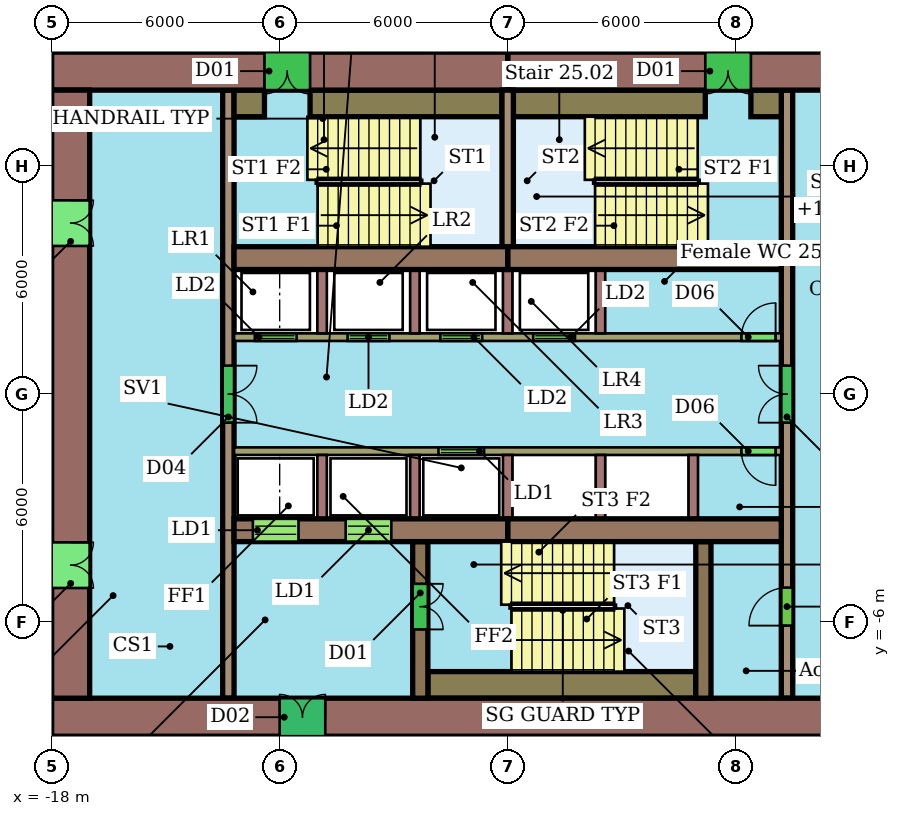
"""IFC4 building model, lengths in metres.
Left out: names, types, materials, properties, quantities, classifications, styles, units other than length and angle.
Written with IfcOpenShell. Run it as: python <this file> out.ifc"""

import sys

from ifc_helpers import new_model, si_unit, direction, frame, frame_2d, origin, place, context, subcontext, project, spatial, rectangle, extrude, element, fill, save


model = new_model("IFC4")
c1 = context("Model", 3, precision=1e-05, world=origin(), true_north=direction((0.0, 1.0)))
c2 = subcontext(c1, "Body", "Model", "MODEL_VIEW")
j1 = project(units=[si_unit("LENGTHUNIT", "METRE"), si_unit("PLANEANGLEUNIT", "RADIAN")], contexts=[c1])
p1 = place(None, origin())
s1 = spatial("IfcSite", under=j1, at=p1, CompositionType="ELEMENT")
p2 = place(p1, origin())
s2 = spatial("IfcBuilding", under=s1, at=p2, CompositionType="ELEMENT")
p3 = place(p2, frame((0.0, 0.0, 110.2)))
s3 = spatial("IfcBuildingStorey", under=s2, at=p3, CompositionType="ELEMENT", Elevation=110.2)
p4 = place(p3, frame((6.0, 8.5, 0.0), z_axis=(0.0, 0.0, 1.0), x_axis=(-1.0, 0.0, 0.0)))
e1 = element("IfcWall", 1, at=p4, inside=s3, PredefinedType="SHEAR", context=c2, shape_type="SweptSolid", body=[
    extrude(rectangle(XDim=12.0, YDim=1.0, at=frame_2d((6.0, 0.0))), origin(), (0.0, 0.0, 1.0), 3.3),
])
p5 = place(p4, frame((5.6, 0.0, 0.0)))
e2 = element("IfcOpeningElement", 2, at=p5, cuts=e1, PredefinedType="OPENING", context=c2, shape_type="SweptSolid", body=[
    extrude(rectangle(XDim=1.2, YDim=2.1, at=frame_2d((0.6, 1.05))), frame((0.0, 0.51, 0.0), z_axis=(0.0, -1.0, 0.0), x_axis=(1.0, 0.0, 0.0)), (0.0, 0.0, 1.0), 1.02),
])
p6 = place(p3, frame((-6.0, 8.5, 0.0), z_axis=(0.0, 0.0, 1.0), x_axis=(-1.0, 0.0, 0.0)))
e3 = element("IfcWall", 3, at=p6, inside=s3, PredefinedType="SHEAR", context=c2, shape_type="SweptSolid", body=[
    extrude(rectangle(XDim=12.0, YDim=1.0, at=frame_2d((6.0, 0.0))), origin(), (0.0, 0.0, 1.0), 3.3),
])
p7 = place(p6, frame((5.2, 0.0, 0.0)))
e4 = element("IfcOpeningElement", 4, at=p7, cuts=e3, PredefinedType="OPENING", context=c2, shape_type="SweptSolid", body=[
    extrude(rectangle(XDim=1.2, YDim=2.1, at=frame_2d((0.6, 1.05))), frame((0.0, 0.51, 0.0), z_axis=(0.0, -1.0, 0.0), x_axis=(1.0, 0.0, 0.0)), (0.0, 0.0, 1.0), 1.02),
])
p8 = place(p3, frame((-18.0, -8.5, 0.0), z_axis=(0.0, 0.0, 1.0), x_axis=(1.0, 0.0, 0.0)))
e5 = element("IfcWall", 5, at=p8, inside=s3, PredefinedType="SHEAR", context=c2, shape_type="SweptSolid", body=[
    extrude(rectangle(XDim=24.0, YDim=1.0, at=frame_2d((12.0, 0.0))), origin(), (0.0, 0.0, 1.0), 3.3),
])
p9 = place(p8, frame((6.0, 0.0, 0.0)))
e6 = element("IfcOpeningElement", 6, at=p9, cuts=e5, PredefinedType="OPENING", context=c2, shape_type="SweptSolid", body=[
    extrude(rectangle(XDim=1.2, YDim=2.1, at=frame_2d((0.6, 1.05))), frame((0.0, 0.51, 0.0), z_axis=(0.0, -1.0, 0.0), x_axis=(1.0, 0.0, 0.0)), (0.0, 0.0, 1.0), 1.02),
])
p10 = place(p3, frame((-17.5, 8.0, 0.0), z_axis=(0.0, 0.0, 1.0), x_axis=(0.0, -1.0, 0.0)))
e7 = element("IfcWall", 7, at=p10, inside=s3, PredefinedType="SHEAR", context=c2, shape_type="SweptSolid", body=[
    extrude(rectangle(XDim=16.0, YDim=1.0, at=frame_2d((8.0, 0.0))), origin(), (0.0, 0.0, 1.0), 3.3),
])
p11 = place(p10, frame((11.9, 0.0, 0.0)))
e8 = element("IfcOpeningElement", 8, at=p11, cuts=e7, PredefinedType="OPENING", context=c2, shape_type="SweptSolid", body=[
    extrude(rectangle(XDim=1.2, YDim=2.1, at=frame_2d((0.6, 1.05))), frame((0.0, 0.51, 0.0), z_axis=(0.0, -1.0, 0.0), x_axis=(1.0, 0.0, 0.0)), (0.0, 0.0, 1.0), 1.02),
])
p12 = place(p10, frame((2.9, 0.0, 0.0)))
e9 = element("IfcOpeningElement", 9, at=p12, cuts=e7, PredefinedType="OPENING", context=c2, shape_type="SweptSolid", body=[
    extrude(rectangle(XDim=1.2, YDim=2.1, at=frame_2d((0.6, 1.05))), frame((0.0, 0.51, 0.0), z_axis=(0.0, -1.0, 0.0), x_axis=(1.0, 0.0, 0.0)), (0.0, 0.0, 1.0), 1.02),
])
for number, where, z_axis, x_axis in (
    (10, (-13.2, 3.58, 0.0), (0.0, 0.0, 1.0), (1.0, 0.0, 0.0)),
    (11, (-6.0, 3.58, 0.0), (0.0, 0.0, 1.0), (1.0, 0.0, 0.0)),
):
    element("IfcWall", number, at=place(p3, frame(where, z_axis=z_axis, x_axis=x_axis)), inside=s3, PredefinedType="SHEAR", context=c2, shape_type="SweptSolid", body=[
        extrude(rectangle(XDim=7.2, YDim=0.6, at=frame_2d((3.6, 0.0))), origin(), (0.0, 0.0, 1.0), 3.3),
    ])
p13 = place(p3, frame((-13.2, -3.58, 0.0), z_axis=(0.0, 0.0, 1.0), x_axis=(1.0, 0.0, 0.0)))
e12 = element("IfcWall", 12, at=p13, inside=s3, PredefinedType="SHEAR", context=c2, shape_type="SweptSolid", body=[
    extrude(rectangle(XDim=7.2, YDim=0.6, at=frame_2d((3.6, 0.0))), origin(), (0.0, 0.0, 1.0), 3.3),
])
p14 = place(p13, frame((0.496, 0.0, 0.0)))
e13 = element("IfcOpeningElement", 13, at=p14, cuts=e12, PredefinedType="OPENING", context=c2, shape_type="SweptSolid", body=[
    extrude(rectangle(XDim=1.2, YDim=2.1, at=frame_2d((0.6, 1.05))), frame((0.0, 0.31, 0.0), z_axis=(0.0, -1.0, 0.0), x_axis=(1.0, 0.0, 0.0)), (0.0, 0.0, 1.0), 0.62),
])
p15 = place(p13, frame((2.938, 0.0, 0.0)))
e14 = element("IfcOpeningElement", 14, at=p15, cuts=e12, PredefinedType="OPENING", context=c2, shape_type="SweptSolid", body=[
    extrude(rectangle(XDim=1.2, YDim=2.1, at=frame_2d((0.6, 1.05))), frame((0.0, 0.31, 0.0), z_axis=(0.0, -1.0, 0.0), x_axis=(1.0, 0.0, 0.0)), (0.0, 0.0, 1.0), 0.62),
])
p16 = place(p3, frame((-6.0, -3.58, 0.0), z_axis=(0.0, 0.0, 1.0), x_axis=(1.0, 0.0, 0.0)))
e15 = element("IfcWall", 15, at=p16, inside=s3, PredefinedType="SHEAR", context=c2, shape_type="SweptSolid", body=[
    extrude(rectangle(XDim=7.2, YDim=0.6, at=frame_2d((3.6, 0.0))), origin(), (0.0, 0.0, 1.0), 3.3),
])
p17 = place(p3, frame((-13.35, 8.0, 0.0), z_axis=(0.0, 0.0, 1.0), x_axis=(0.0, -1.0, 0.0)))
e16 = element("IfcWall", 16, at=p17, inside=s3, PredefinedType="SHEAR", context=c2, shape_type="SweptSolid", body=[
    extrude(rectangle(XDim=16.0, YDim=0.3, at=frame_2d((8.0, 0.0))), origin(), (0.0, 0.0, 1.0), 3.3),
])
p18 = place(p17, frame((7.25, 0.0, 0.0)))
e17 = element("IfcOpeningElement", 17, at=p18, cuts=e16, PredefinedType="OPENING", context=c2, shape_type="SweptSolid", body=[
    extrude(rectangle(XDim=1.5, YDim=2.1, at=frame_2d((0.75, 1.05))), frame((0.0, 0.16, 0.0), z_axis=(0.0, -1.0, 0.0), x_axis=(1.0, 0.0, 0.0)), (0.0, 0.0, 1.0), 0.32),
])
p19 = place(p3, frame((1.35, -8.0, 0.0), z_axis=(0.0, 0.0, 1.0), x_axis=(0.0, 1.0, 0.0)))
e18 = element("IfcWall", 18, at=p19, inside=s3, PredefinedType="SHEAR", context=c2, shape_type="SweptSolid", body=[
    extrude(rectangle(XDim=16.0, YDim=0.3, at=frame_2d((8.0, 0.0))), origin(), (0.0, 0.0, 1.0), 3.3),
])
p20 = place(p19, frame((1.91, 0.0, 0.0)))
e19 = element("IfcOpeningElement", 19, at=p20, cuts=e18, PredefinedType="OPENING", context=c2, shape_type="SweptSolid", body=[
    extrude(rectangle(XDim=1.0, YDim=2.1, at=frame_2d((0.5, 1.05))), frame((0.0, 0.16, 0.0), z_axis=(0.0, -1.0, 0.0), x_axis=(1.0, 0.0, 0.0)), (0.0, 0.0, 1.0), 0.32),
])
p21 = place(p19, frame((7.25, 0.0, 0.0)))
e20 = element("IfcOpeningElement", 20, at=p21, cuts=e18, PredefinedType="OPENING", context=c2, shape_type="SweptSolid", body=[
    extrude(rectangle(XDim=1.5, YDim=2.1, at=frame_2d((0.75, 1.05))), frame((0.0, 0.16, 0.0), z_axis=(0.0, -1.0, 0.0), x_axis=(1.0, 0.0, 0.0)), (0.0, 0.0, 1.0), 0.32),
])
p22 = place(p3, frame((-13.2, 1.5, 0.0), z_axis=(0.0, 0.0, 1.0), x_axis=(1.0, 0.0, 0.0)))
e21 = element("IfcWall", 21, at=p22, inside=s3, PredefinedType="SHEAR", context=c2, shape_type="SweptSolid", body=[
    extrude(rectangle(XDim=14.4, YDim=0.2, at=frame_2d((7.2, 0.0))), origin(), (0.0, 0.0, 1.0), 3.3),
])
p23 = place(p22, frame((0.546, 0.0, 0.0)))
e22 = element("IfcOpeningElement", 22, at=p23, cuts=e21, PredefinedType="OPENING", context=c2, shape_type="SweptSolid", body=[
    extrude(rectangle(XDim=1.1, YDim=2.1, at=frame_2d((0.55, 1.05))), frame((0.0, 0.11, 0.0), z_axis=(0.0, -1.0, 0.0), x_axis=(1.0, 0.0, 0.0)), (0.0, 0.0, 1.0), 0.22),
])
p24 = place(p22, frame((2.988, 0.0, 0.0)))
e23 = element("IfcOpeningElement", 23, at=p24, cuts=e21, PredefinedType="OPENING", context=c2, shape_type="SweptSolid", body=[
    extrude(rectangle(XDim=1.1, YDim=2.1, at=frame_2d((0.55, 1.05))), frame((0.0, 0.11, 0.0), z_axis=(0.0, -1.0, 0.0), x_axis=(1.0, 0.0, 0.0)), (0.0, 0.0, 1.0), 0.22),
])
p25 = place(p22, frame((5.429, 0.0, 0.0)))
e24 = element("IfcOpeningElement", 24, at=p25, cuts=e21, PredefinedType="OPENING", context=c2, shape_type="SweptSolid", body=[
    extrude(rectangle(XDim=1.1, YDim=2.1, at=frame_2d((0.55, 1.05))), frame((0.0, 0.11, 0.0), z_axis=(0.0, -1.0, 0.0), x_axis=(1.0, 0.0, 0.0)), (0.0, 0.0, 1.0), 0.22),
])
p26 = place(p22, frame((7.871, 0.0, 0.0)))
e25 = element("IfcOpeningElement", 25, at=p26, cuts=e21, PredefinedType="OPENING", context=c2, shape_type="SweptSolid", body=[
    extrude(rectangle(XDim=1.1, YDim=2.1, at=frame_2d((0.55, 1.05))), frame((0.0, 0.11, 0.0), z_axis=(0.0, -1.0, 0.0), x_axis=(1.0, 0.0, 0.0)), (0.0, 0.0, 1.0), 0.22),
])
p27 = place(p22, frame((13.35, 0.0, 0.0)))
e26 = element("IfcOpeningElement", 26, at=p27, cuts=e21, PredefinedType="OPENING", context=c2, shape_type="SweptSolid", body=[
    extrude(rectangle(XDim=0.9, YDim=2.1, at=frame_2d((0.45, 1.05))), frame((0.0, 0.11, 0.0), z_axis=(0.0, -1.0, 0.0), x_axis=(1.0, 0.0, 0.0)), (0.0, 0.0, 1.0), 0.22),
])
p28 = place(p3, frame((1.2, -1.5, 0.0), z_axis=(0.0, 0.0, 1.0), x_axis=(-1.0, 0.0, 0.0)))
e27 = element("IfcWall", 27, at=p28, inside=s3, PredefinedType="SHEAR", context=c2, shape_type="SweptSolid", body=[
    extrude(rectangle(XDim=14.4, YDim=0.2, at=frame_2d((7.2, 0.0))), origin(), (0.0, 0.0, 1.0), 3.3),
])
p29 = place(p28, frame((7.821, 0.0, 0.0)))
e28 = element("IfcOpeningElement", 28, at=p29, cuts=e27, PredefinedType="OPENING", context=c2, shape_type="SweptSolid", body=[
    extrude(rectangle(XDim=1.2, YDim=2.1, at=frame_2d((0.6, 1.05))), frame((0.0, 0.11, 0.0), z_axis=(0.0, -1.0, 0.0), x_axis=(1.0, 0.0, 0.0)), (0.0, 0.0, 1.0), 0.22),
])
p30 = place(p28, frame((0.15, 0.0, 0.0)))
e29 = element("IfcOpeningElement", 29, at=p30, cuts=e27, PredefinedType="OPENING", context=c2, shape_type="SweptSolid", body=[
    extrude(rectangle(XDim=0.9, YDim=2.1, at=frame_2d((0.45, 1.05))), frame((0.0, 0.11, 0.0), z_axis=(0.0, -1.0, 0.0), x_axis=(1.0, 0.0, 0.0)), (0.0, 0.0, 1.0), 0.22),
])
p31 = place(p3, frame((-8.3, -3.88, 0.0), z_axis=(0.0, 0.0, 1.0), x_axis=(0.0, -1.0, 0.0)))
e30 = element("IfcWall", 30, at=p31, inside=s3, PredefinedType="SHEAR", context=c2, shape_type="SweptSolid", body=[
    extrude(rectangle(XDim=4.12, YDim=0.4, at=frame_2d((2.06, 0.0))), origin(), (0.0, 0.0, 1.0), 3.3),
])
p32 = place(p31, frame((1.11, 0.0, 0.0)))
e31 = element("IfcOpeningElement", 31, at=p32, cuts=e30, PredefinedType="OPENING", context=c2, shape_type="SweptSolid", body=[
    extrude(rectangle(XDim=1.2, YDim=2.1, at=frame_2d((0.6, 1.05))), frame((0.0, 0.21, 0.0), z_axis=(0.0, -1.0, 0.0), x_axis=(1.0, 0.0, 0.0)), (0.0, 0.0, 1.0), 0.42),
])
p33 = place(p3, frame((-0.85, -3.88, 0.0), z_axis=(0.0, 0.0, 1.0), x_axis=(0.0, -1.0, 0.0)))
e32 = element("IfcWall", 32, at=p33, inside=s3, PredefinedType="SHEAR", context=c2, shape_type="SweptSolid", body=[
    extrude(rectangle(XDim=4.12, YDim=0.4, at=frame_2d((2.06, 0.0))), origin(), (0.0, 0.0, 1.0), 3.3),
])
p34 = place(p3, frame((-6.0, 3.88, 0.0), z_axis=(0.0, 0.0, 1.0), x_axis=(0.0, 1.0, 0.0)))
e33 = element("IfcWall", 33, at=p34, inside=s3, PredefinedType="SHEAR", context=c2, shape_type="SweptSolid", body=[
    extrude(rectangle(XDim=4.12, YDim=0.3, at=frame_2d((2.06, 0.0))), origin(), (0.0, 0.0, 1.0), 3.3),
])
p35 = place(p3, frame((-13.2, 7.65, 0.0), z_axis=(0.0, 0.0, 1.0), x_axis=(1.0, 0.0, 0.0)))
e34 = element("IfcWall", 34, at=p35, inside=s3, PredefinedType="SHEAR", context=c2, shape_type="SweptSolid", body=[
    extrude(rectangle(XDim=0.8, YDim=0.7, at=frame_2d((0.4, 0.0))), origin(), (0.0, 0.0, 1.0), 3.3),
])
for number, where, z_axis, x_axis in (
    (35, (-11.2, 7.65, 0.0), (0.0, 0.0, 1.0), (1.0, 0.0, 0.0)),
    (36, (-5.85, 7.65, 0.0), (0.0, 0.0, 1.0), (1.0, 0.0, 0.0)),
):
    element("IfcWall", number, at=place(p3, frame(where, z_axis=z_axis, x_axis=x_axis)), inside=s3, PredefinedType="SHEAR", context=c2, shape_type="SweptSolid", body=[
        extrude(rectangle(XDim=5.05, YDim=0.7, at=frame_2d((2.525, 0.0))), origin(), (0.0, 0.0, 1.0), 3.3),
    ])
p36 = place(p3, frame((0.4, 7.65, 0.0), z_axis=(0.0, 0.0, 1.0), x_axis=(1.0, 0.0, 0.0)))
e37 = element("IfcWall", 37, at=p36, inside=s3, PredefinedType="SHEAR", context=c2, shape_type="SweptSolid", body=[
    extrude(rectangle(XDim=0.8, YDim=0.7, at=frame_2d((0.4, 0.0))), origin(), (0.0, 0.0, 1.0), 3.3),
])
p37 = place(p3, frame((-8.1, -7.65, 0.0), z_axis=(0.0, 0.0, 1.0), x_axis=(1.0, 0.0, 0.0)))
e38 = element("IfcWall", 38, at=p37, inside=s3, PredefinedType="SHEAR", context=c2, shape_type="SweptSolid", body=[
    extrude(rectangle(XDim=7.05, YDim=0.7, at=frame_2d((3.525, 0.0))), origin(), (0.0, 0.0, 1.0), 3.3),
])
for number, where, z_axis, x_axis in (
    (39, (-10.883, 1.6, 0.0), (0.0, 0.0, 1.0), (0.0, 1.0, 0.0)),
    (40, (-8.442, 1.6, 0.0), (0.0, 0.0, 1.0), (0.0, 1.0, 0.0)),
    (41, (-6.0, 1.6, 0.0), (0.0, 0.0, 1.0), (0.0, 1.0, 0.0)),
    (42, (-3.558, 1.6, 0.0), (0.0, 0.0, 1.0), (0.0, 1.0, 0.0)),
    (43, (-10.883, -1.6, 0.0), (0.0, 0.0, 1.0), (0.0, -1.0, 0.0)),
    (44, (-8.442, -1.6, 0.0), (0.0, 0.0, 1.0), (0.0, -1.0, 0.0)),
    (45, (-6.0, -1.6, 0.0), (0.0, 0.0, 1.0), (0.0, -1.0, 0.0)),
    (46, (-3.558, -1.6, 0.0), (0.0, 0.0, 1.0), (0.0, -1.0, 0.0)),
    (47, (-1.117, -1.6, 0.0), (0.0, 0.0, 1.0), (0.0, -1.0, 0.0)),
):
    element("IfcWall", number, at=place(p3, frame(where, z_axis=z_axis, x_axis=x_axis)), inside=s3, PredefinedType="SHEAR", context=c2, shape_type="SweptSolid", body=[
        extrude(rectangle(XDim=1.68, YDim=0.25, at=frame_2d((0.84, 0.0))), origin(), (0.0, 0.0, 1.0), 3.3),
    ])
p38 = place(p5, origin())
e48 = element("IfcDoor", 48, at=p38, inside=s3, OperationType="DOUBLE_DOOR_SINGLE_SWING", PredefinedType="NOTDEFINED", context=c2, shape_type="SweptSolid", body=[
    extrude(rectangle(XDim=1.2, YDim=2.1, at=frame_2d((0.6, 1.05))), frame((0.0, 0.025, 0.0), z_axis=(0.0, -1.0, 0.0), x_axis=(1.0, 0.0, 0.0)), (0.0, 0.0, 1.0), 0.05),
])
fill(e2, e48)
p39 = place(p7, origin())
e49 = element("IfcDoor", 49, at=p39, inside=s3, OperationType="DOUBLE_DOOR_SINGLE_SWING", PredefinedType="NOTDEFINED", context=c2, shape_type="SweptSolid", body=[
    extrude(rectangle(XDim=1.2, YDim=2.1, at=frame_2d((0.6, 1.05))), frame((0.0, 0.025, 0.0), z_axis=(0.0, -1.0, 0.0), x_axis=(1.0, 0.0, 0.0)), (0.0, 0.0, 1.0), 0.05),
])
fill(e4, e49)
p40 = place(p9, origin())
e50 = element("IfcDoor", 50, at=p40, inside=s3, OperationType="DOUBLE_DOOR_SINGLE_SWING", PredefinedType="NOTDEFINED", context=c2, shape_type="SweptSolid", body=[
    extrude(rectangle(XDim=1.2, YDim=2.1, at=frame_2d((0.6, 1.05))), frame((0.0, 0.025, 0.0), z_axis=(0.0, -1.0, 0.0), x_axis=(1.0, 0.0, 0.0)), (0.0, 0.0, 1.0), 0.05),
])
fill(e6, e50)
p41 = place(p11, origin())
e51 = element("IfcDoor", 51, at=p41, inside=s3, OperationType="DOUBLE_DOOR_SINGLE_SWING", PredefinedType="NOTDEFINED", context=c2, shape_type="SweptSolid", body=[
    extrude(rectangle(XDim=1.2, YDim=2.1, at=frame_2d((0.6, 1.05))), frame((0.0, 0.025, 0.0), z_axis=(0.0, -1.0, 0.0), x_axis=(1.0, 0.0, 0.0)), (0.0, 0.0, 1.0), 0.05),
])
fill(e8, e51)
p42 = place(p12, origin())
e52 = element("IfcDoor", 52, at=p42, inside=s3, OperationType="DOUBLE_DOOR_SINGLE_SWING", PredefinedType="NOTDEFINED", context=c2, shape_type="SweptSolid", body=[
    extrude(rectangle(XDim=1.2, YDim=2.1, at=frame_2d((0.6, 1.05))), frame((0.0, 0.025, 0.0), z_axis=(0.0, -1.0, 0.0), x_axis=(1.0, 0.0, 0.0)), (0.0, 0.0, 1.0), 0.05),
])
fill(e9, e52)
p43 = place(p14, origin())
e53 = element("IfcDoor", 53, at=p43, inside=s3, OperationType="DOUBLE_DOOR_SLIDING", PredefinedType="NOTDEFINED", context=c2, shape_type="SweptSolid", body=[
    extrude(rectangle(XDim=1.2, YDim=2.1, at=frame_2d((0.6, 1.05))), frame((0.0, 0.025, 0.0), z_axis=(0.0, -1.0, 0.0), x_axis=(1.0, 0.0, 0.0)), (0.0, 0.0, 1.0), 0.05),
])
fill(e13, e53)
p44 = place(p15, origin())
e54 = element("IfcDoor", 54, at=p44, inside=s3, OperationType="DOUBLE_DOOR_SLIDING", PredefinedType="NOTDEFINED", context=c2, shape_type="SweptSolid", body=[
    extrude(rectangle(XDim=1.2, YDim=2.1, at=frame_2d((0.6, 1.05))), frame((0.0, 0.025, 0.0), z_axis=(0.0, -1.0, 0.0), x_axis=(1.0, 0.0, 0.0)), (0.0, 0.0, 1.0), 0.05),
])
fill(e14, e54)
p45 = place(p18, origin())
e55 = element("IfcDoor", 55, at=p45, inside=s3, OperationType="DOUBLE_DOOR_SINGLE_SWING", PredefinedType="NOTDEFINED", context=c2, shape_type="SweptSolid", body=[
    extrude(rectangle(XDim=1.5, YDim=2.1, at=frame_2d((0.75, 1.05))), frame((0.0, 0.025, 0.0), z_axis=(0.0, -1.0, 0.0), x_axis=(1.0, 0.0, 0.0)), (0.0, 0.0, 1.0), 0.05),
])
fill(e17, e55)
p46 = place(p20, origin())
e56 = element("IfcDoor", 56, at=p46, inside=s3, OperationType="SINGLE_SWING_LEFT", PredefinedType="NOTDEFINED", context=c2, shape_type="SweptSolid", body=[
    extrude(rectangle(XDim=1.0, YDim=2.1, at=frame_2d((0.5, 1.05))), frame((0.0, 0.025, 0.0), z_axis=(0.0, -1.0, 0.0), x_axis=(1.0, 0.0, 0.0)), (0.0, 0.0, 1.0), 0.05),
])
fill(e19, e56)
p47 = place(p21, origin())
e57 = element("IfcDoor", 57, at=p47, inside=s3, OperationType="DOUBLE_DOOR_SINGLE_SWING", PredefinedType="NOTDEFINED", context=c2, shape_type="SweptSolid", body=[
    extrude(rectangle(XDim=1.5, YDim=2.1, at=frame_2d((0.75, 1.05))), frame((0.0, 0.025, 0.0), z_axis=(0.0, -1.0, 0.0), x_axis=(1.0, 0.0, 0.0)), (0.0, 0.0, 1.0), 0.05),
])
fill(e20, e57)
p48 = place(p23, origin())
e58 = element("IfcDoor", 58, at=p48, inside=s3, OperationType="DOUBLE_DOOR_SLIDING", PredefinedType="NOTDEFINED", context=c2, shape_type="SweptSolid", body=[
    extrude(rectangle(XDim=1.1, YDim=2.1, at=frame_2d((0.55, 1.05))), frame((0.0, 0.025, 0.0), z_axis=(0.0, -1.0, 0.0), x_axis=(1.0, 0.0, 0.0)), (0.0, 0.0, 1.0), 0.05),
])
fill(e22, e58)
p49 = place(p24, origin())
e59 = element("IfcDoor", 59, at=p49, inside=s3, OperationType="DOUBLE_DOOR_SLIDING", PredefinedType="NOTDEFINED", context=c2, shape_type="SweptSolid", body=[
    extrude(rectangle(XDim=1.1, YDim=2.1, at=frame_2d((0.55, 1.05))), frame((0.0, 0.025, 0.0), z_axis=(0.0, -1.0, 0.0), x_axis=(1.0, 0.0, 0.0)), (0.0, 0.0, 1.0), 0.05),
])
fill(e23, e59)
p50 = place(p25, origin())
e60 = element("IfcDoor", 60, at=p50, inside=s3, OperationType="DOUBLE_DOOR_SLIDING", PredefinedType="NOTDEFINED", context=c2, shape_type="SweptSolid", body=[
    extrude(rectangle(XDim=1.1, YDim=2.1, at=frame_2d((0.55, 1.05))), frame((0.0, 0.025, 0.0), z_axis=(0.0, -1.0, 0.0), x_axis=(1.0, 0.0, 0.0)), (0.0, 0.0, 1.0), 0.05),
])
fill(e24, e60)
p51 = place(p26, origin())
e61 = element("IfcDoor", 61, at=p51, inside=s3, OperationType="DOUBLE_DOOR_SLIDING", PredefinedType="NOTDEFINED", context=c2, shape_type="SweptSolid", body=[
    extrude(rectangle(XDim=1.1, YDim=2.1, at=frame_2d((0.55, 1.05))), frame((0.0, 0.025, 0.0), z_axis=(0.0, -1.0, 0.0), x_axis=(1.0, 0.0, 0.0)), (0.0, 0.0, 1.0), 0.05),
])
fill(e25, e61)
p52 = place(p27, origin())
e62 = element("IfcDoor", 62, at=p52, inside=s3, OperationType="SINGLE_SWING_RIGHT", PredefinedType="NOTDEFINED", context=c2, shape_type="SweptSolid", body=[
    extrude(rectangle(XDim=0.9, YDim=2.1, at=frame_2d((0.45, 1.05))), frame((0.0, 0.025, 0.0), z_axis=(0.0, -1.0, 0.0), x_axis=(1.0, 0.0, 0.0)), (0.0, 0.0, 1.0), 0.05),
])
fill(e26, e62)
p53 = place(p29, origin())
e63 = element("IfcDoor", 63, at=p53, inside=s3, OperationType="DOUBLE_DOOR_SLIDING", PredefinedType="NOTDEFINED", context=c2, shape_type="SweptSolid", body=[
    extrude(rectangle(XDim=1.2, YDim=2.1, at=frame_2d((0.6, 1.05))), frame((0.0, 0.025, 0.0), z_axis=(0.0, -1.0, 0.0), x_axis=(1.0, 0.0, 0.0)), (0.0, 0.0, 1.0), 0.05),
])
fill(e28, e63)
p54 = place(p30, origin())
e64 = element("IfcDoor", 64, at=p54, inside=s3, OperationType="SINGLE_SWING_LEFT", PredefinedType="NOTDEFINED", context=c2, shape_type="SweptSolid", body=[
    extrude(rectangle(XDim=0.9, YDim=2.1, at=frame_2d((0.45, 1.05))), frame((0.0, 0.025, 0.0), z_axis=(0.0, -1.0, 0.0), x_axis=(1.0, 0.0, 0.0)), (0.0, 0.0, 1.0), 0.05),
])
fill(e29, e64)
p55 = place(p32, origin())
e65 = element("IfcDoor", 65, at=p55, inside=s3, OperationType="DOUBLE_DOOR_SINGLE_SWING", PredefinedType="NOTDEFINED", context=c2, shape_type="SweptSolid", body=[
    extrude(rectangle(XDim=1.2, YDim=2.1, at=frame_2d((0.6, 1.05))), frame((0.0, 0.025, 0.0), z_axis=(0.0, -1.0, 0.0), x_axis=(1.0, 0.0, 0.0)), (0.0, 0.0, 1.0), 0.05),
])
fill(e31, e65)
save(model, sys.argv[1])
